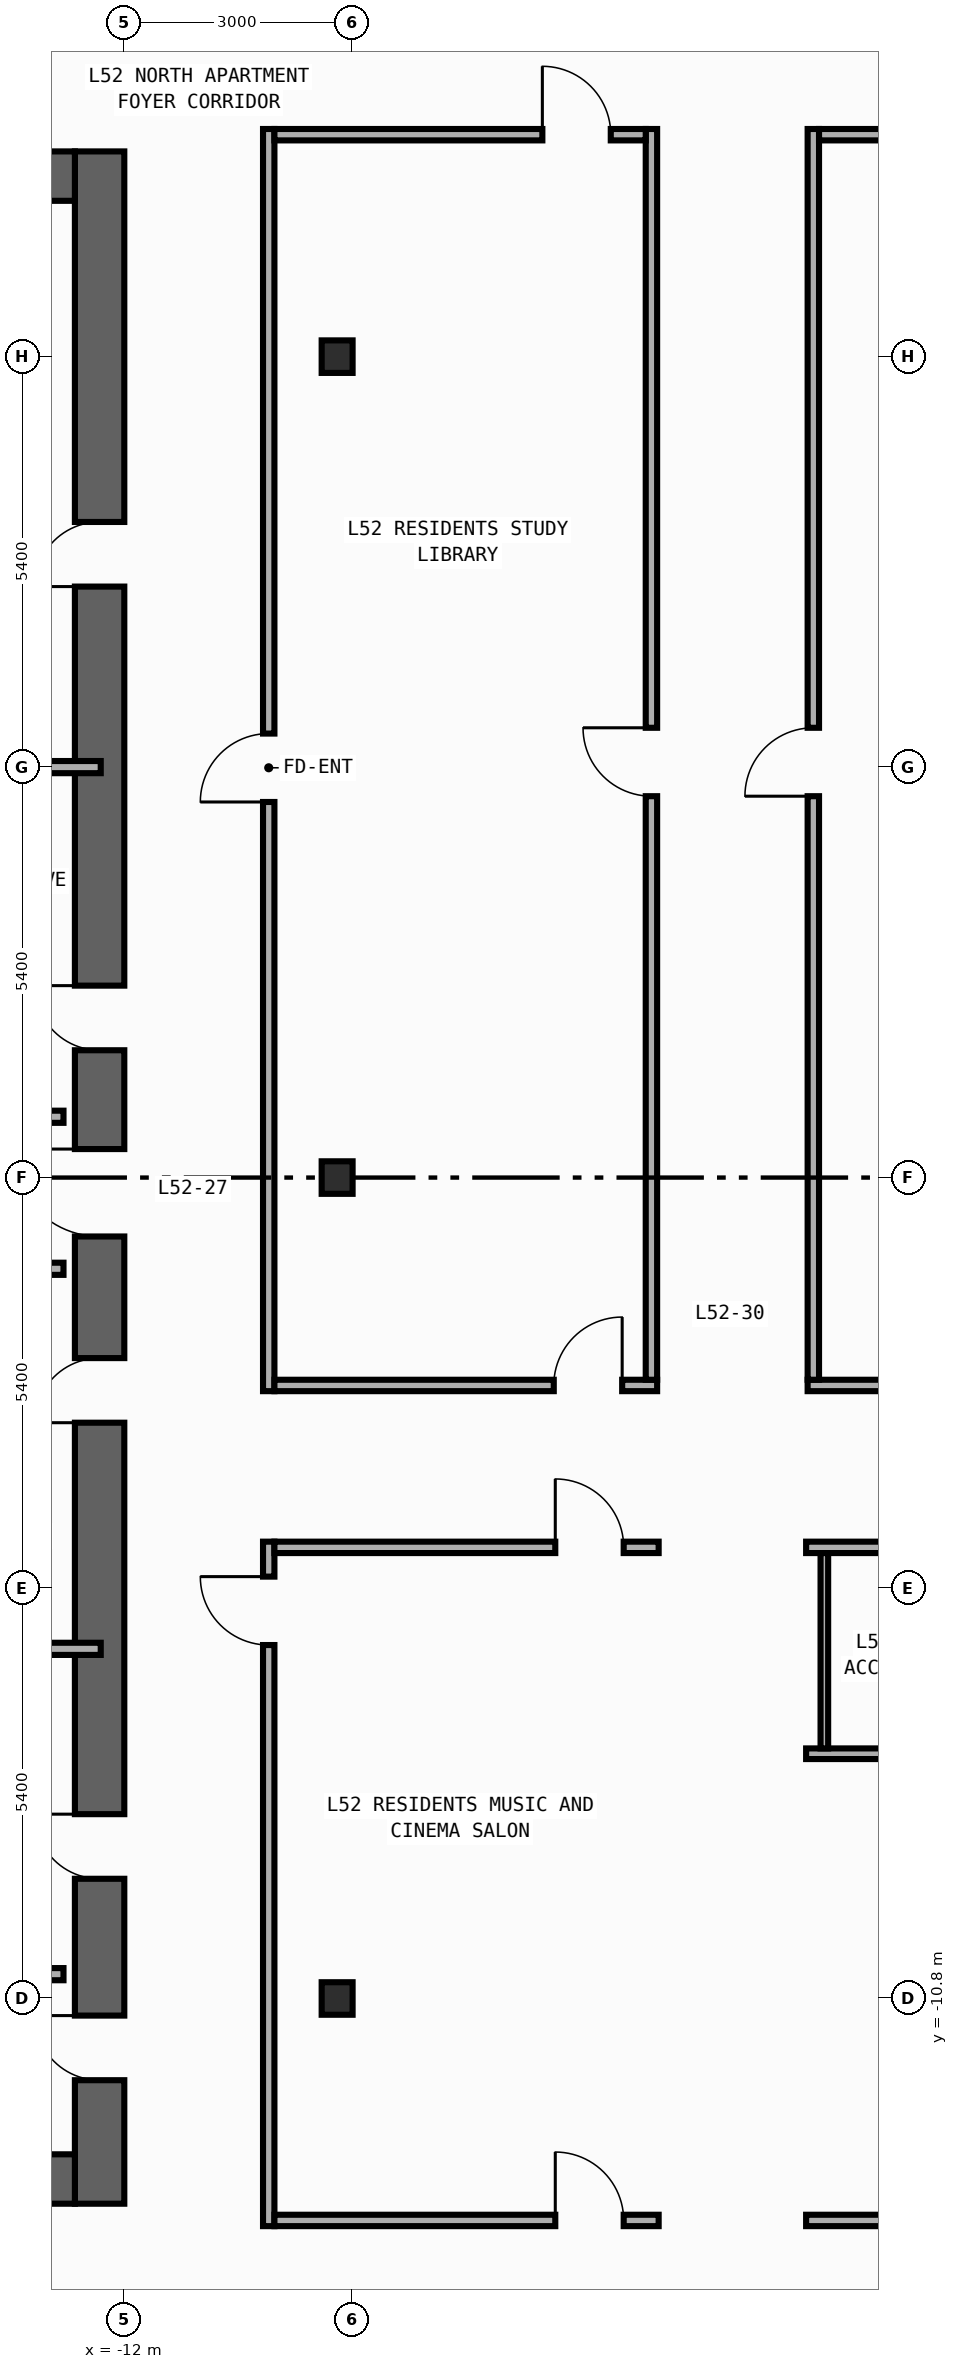
"""IFC4 building model, lengths in metres.
Left out: names, types, materials, properties, quantities, classifications, styles, units other than length and angle.
Written with IfcOpenShell. Run it as: python <this file> out.ifc"""

import sys

from ifc_helpers import new_model, si_unit, direction, frame, frame_2d, origin, origin_2d, place, context, subcontext, project, spatial, rectangle, i_section, extrude, element, fill, save


model = new_model("IFC4")
c1 = context("Model", 3, precision=1e-05, world=origin(), true_north=direction((0.0, 1.0)))
c2 = subcontext(c1, "Body", "Model", "MODEL_VIEW")
j1 = project(units=[si_unit("LENGTHUNIT", "METRE"), si_unit("PLANEANGLEUNIT", "RADIAN")], contexts=[c1])
p1 = place(None, origin())
s1 = spatial("IfcSite", under=j1, at=p1, CompositionType="ELEMENT")
p2 = place(p1, origin())
s2 = spatial("IfcBuilding", under=s1, at=p2, CompositionType="ELEMENT")
p3 = place(p2, frame((0.0, 0.0, 226.0)))
s3 = spatial("IfcBuildingStorey", under=s2, at=p3, CompositionType="ELEMENT", Elevation=226.0)
p4 = place(p3, frame((-12.325, -13.5, 0.0), z_axis=(0.0, 0.0, 1.0), x_axis=(0.0, 1.0, 0.0)))
e1 = element("IfcWall", 1, at=p4, inside=s3, PredefinedType="SHEAR", context=c2, shape_type="SweptSolid", body=[
    extrude(rectangle(XDim=27.0, YDim=0.65, at=frame_2d((13.5, 0.0))), origin(), (0.0, 0.0, 1.0), 3.34),
])
p5 = place(p4, frame((15.175, 0.0, 0.0)))
e2 = element("IfcOpeningElement", 2, at=p5, cuts=e1, PredefinedType="OPENING", context=c2, shape_type="SweptSolid", body=[
    extrude(rectangle(XDim=0.85, YDim=2.1, at=frame_2d((0.425, 1.05))), frame((0.0, 0.335, 0.0), z_axis=(0.0, -1.0, 0.0), x_axis=(1.0, 0.0, 0.0)), (0.0, 0.0, 1.0), 0.67),
])
p6 = place(p4, frame((21.275, 0.0, 0.0)))
e3 = element("IfcOpeningElement", 3, at=p6, cuts=e1, PredefinedType="OPENING", context=c2, shape_type="SweptSolid", body=[
    extrude(rectangle(XDim=0.85, YDim=2.1, at=frame_2d((0.425, 1.05))), frame((0.0, 0.335, 0.0), z_axis=(0.0, -1.0, 0.0), x_axis=(1.0, 0.0, 0.0)), (0.0, 0.0, 1.0), 0.67),
])
p7 = place(p4, frame((4.275, 0.0, 0.0)))
e4 = element("IfcOpeningElement", 4, at=p7, cuts=e1, PredefinedType="OPENING", context=c2, shape_type="SweptSolid", body=[
    extrude(rectangle(XDim=0.85, YDim=2.1, at=frame_2d((0.425, 1.05))), frame((0.0, 0.335, 0.0), z_axis=(0.0, -1.0, 0.0), x_axis=(1.0, 0.0, 0.0)), (0.0, 0.0, 1.0), 0.67),
])
p8 = place(p4, frame((10.275, 0.0, 0.0)))
e5 = element("IfcOpeningElement", 5, at=p8, cuts=e1, PredefinedType="OPENING", context=c2, shape_type="SweptSolid", body=[
    extrude(rectangle(XDim=0.85, YDim=2.1, at=frame_2d((0.425, 1.05))), frame((0.0, 0.335, 0.0), z_axis=(0.0, -1.0, 0.0), x_axis=(1.0, 0.0, 0.0)), (0.0, 0.0, 1.0), 0.67),
])
p9 = place(p4, frame((12.725, 0.0, 0.0)))
e6 = element("IfcOpeningElement", 6, at=p9, cuts=e1, PredefinedType="OPENING", context=c2, shape_type="SweptSolid", body=[
    extrude(rectangle(XDim=1.15, YDim=2.2, at=frame_2d((0.575, 1.1))), frame((0.0, 0.335, 0.0), z_axis=(0.0, -1.0, 0.0), x_axis=(1.0, 0.0, 0.0)), (0.0, 0.0, 1.0), 0.67),
])
p10 = place(p4, frame((1.625, 0.0, 0.0)))
e7 = element("IfcOpeningElement", 7, at=p10, cuts=e1, PredefinedType="OPENING", context=c2, shape_type="SweptSolid", body=[
    extrude(rectangle(XDim=0.85, YDim=2.1, at=frame_2d((0.425, 1.05))), frame((0.0, 0.335, 0.0), z_axis=(0.0, -1.0, 0.0), x_axis=(1.0, 0.0, 0.0)), (0.0, 0.0, 1.0), 0.67),
])
for number, where, z_axis, x_axis in (
    (8, (-19.75, -13.175, 0.0), (0.0, 0.0, 1.0), (1.0, 0.0, 0.0)),
    (9, (-19.75, 13.175, 0.0), (0.0, 0.0, 1.0), (1.0, 0.0, 0.0)),
):
    element("IfcWall", number, at=place(p3, frame(where, z_axis=z_axis, x_axis=x_axis)), inside=s3, PredefinedType="SHEAR", context=c2, shape_type="SweptSolid", body=[
        extrude(rectangle(XDim=7.1, YDim=0.65, at=frame_2d((3.55, 0.0))), origin(), (0.0, 0.0, 1.0), 3.34),
    ])
for number, where, z_axis, x_axis in (
    (10, (-9.2, -10.8, 0.0), (0.0, 0.0, 1.0), (1.0, 0.0, 0.0)),
    (11, (-9.2, 0.0, 0.0), (0.0, 0.0, 1.0), (1.0, 0.0, 0.0)),
    (12, (-9.2, 10.8, 0.0), (0.0, 0.0, 1.0), (1.0, 0.0, 0.0)),
):
    element("IfcColumn", number, at=place(p3, frame(where, z_axis=z_axis, x_axis=x_axis)), inside=s3, PredefinedType="COLUMN", context=c2, shape_type="SweptSolid", body=[
        extrude(i_section(OverallWidth=0.407, OverallDepth=0.428, WebThickness=0.02, FlangeThickness=0.035, FilletRadius=0.022, at=origin_2d()), origin(), (0.0, 0.0, 1.0), 3.6),
    ])
for number, where, z_axis, x_axis in (
    (13, (-15.4, 0.8, 0.0), (0.0, 0.0, 1.0), (1.0, 0.0, 0.0)),
    (14, (-15.4, -1.2, 0.0), (0.0, 0.0, 1.0), (1.0, 0.0, 0.0)),
    (15, (-15.4, -10.48, 0.0), (0.0, 0.0, 1.0), (1.0, 0.0, 0.0)),
):
    element("IfcWall", number, at=place(p3, frame(where, z_axis=z_axis, x_axis=x_axis)), inside=s3, PredefinedType="STANDARD", context=c2, shape_type="SweptSolid", body=[
        extrude(rectangle(XDim=2.6, YDim=0.16, at=frame_2d((1.3, 0.0))), origin(), (0.0, 0.0, 1.0), 3.34),
    ])
for number, where, z_axis, x_axis in (
    (16, (-15.375, 5.4, 0.0), (0.0, 0.0, 1.0), (1.0, 0.0, 0.0)),
    (17, (-15.375, -6.2, 0.0), (0.0, 0.0, 1.0), (1.0, 0.0, 0.0)),
):
    element("IfcWall", number, at=place(p3, frame(where, z_axis=z_axis, x_axis=x_axis)), inside=s3, PredefinedType="PARTITIONING", context=c2, shape_type="SweptSolid", body=[
        extrude(rectangle(XDim=3.065, YDim=0.16, at=frame_2d((1.532, 0.0))), origin(), (0.0, 0.0, 1.0), 3.34),
    ])
p11 = place(p3, frame((-10.1, -2.81, 0.0), z_axis=(0.0, 0.0, 1.0), x_axis=(0.0, 1.0, 0.0)))
e18 = element("IfcWall", 18, at=p11, inside=s3, PredefinedType="PARTITIONING", context=c2, shape_type="SweptSolid", body=[
    extrude(rectangle(XDim=16.605, YDim=0.15, at=frame_2d((8.302, 0.0))), origin(), (0.0, 0.0, 1.0), 3.34),
])
p12 = place(p11, frame((7.751, 0.0, 0.0)))
e19 = element("IfcOpeningElement", 19, at=p12, cuts=e18, PredefinedType="OPENING", context=c2, shape_type="SweptSolid", body=[
    extrude(rectangle(XDim=0.9, YDim=2.15, at=frame_2d((0.45, 1.075))), frame((0.0, 0.085, 0.0), z_axis=(0.0, -1.0, 0.0), x_axis=(1.0, 0.0, 0.0)), (0.0, 0.0, 1.0), 0.17),
])
p13 = place(p3, frame((-10.1, -13.795, 0.0), z_axis=(0.0, 0.0, 1.0), x_axis=(0.0, 1.0, 0.0)))
e20 = element("IfcWall", 20, at=p13, inside=s3, PredefinedType="PARTITIONING", context=c2, shape_type="SweptSolid", body=[
    extrude(rectangle(XDim=9.005, YDim=0.15, at=frame_2d((4.502, 0.0))), origin(), (0.0, 0.0, 1.0), 3.34),
])
p14 = place(p13, frame((7.645, 0.0, 0.0)))
e21 = element("IfcOpeningElement", 21, at=p14, cuts=e20, PredefinedType="OPENING", context=c2, shape_type="SweptSolid", body=[
    extrude(rectangle(XDim=0.9, YDim=2.15, at=frame_2d((0.45, 1.075))), frame((0.0, 0.085, 0.0), z_axis=(0.0, -1.0, 0.0), x_axis=(1.0, 0.0, 0.0)), (0.0, 0.0, 1.0), 0.17),
])
p15 = place(p3, frame((-10.025, -2.735, 0.0), z_axis=(0.0, 0.0, 1.0), x_axis=(1.0, 0.0, 0.0)))
e22 = element("IfcWall", 22, at=p15, inside=s3, PredefinedType="PARTITIONING", context=c2, shape_type="SweptSolid", body=[
    extrude(rectangle(XDim=5.035, YDim=0.15, at=frame_2d((2.518, 0.0))), origin(), (0.0, 0.0, 1.0), 3.34),
])
p16 = place(p15, frame((3.675, 0.0, 0.0)))
e23 = element("IfcOpeningElement", 23, at=p16, cuts=e22, PredefinedType="OPENING", context=c2, shape_type="SweptSolid", body=[
    extrude(rectangle(XDim=0.9, YDim=2.15, at=frame_2d((0.45, 1.075))), frame((0.0, 0.085, 0.0), z_axis=(0.0, -1.0, 0.0), x_axis=(1.0, 0.0, 0.0)), (0.0, 0.0, 1.0), 0.17),
])
p17 = place(p3, frame((-10.025, -4.865, 0.0), z_axis=(0.0, 0.0, 1.0), x_axis=(1.0, 0.0, 0.0)))
e24 = element("IfcWall", 24, at=p17, inside=s3, PredefinedType="PARTITIONING", context=c2, shape_type="SweptSolid", body=[
    extrude(rectangle(XDim=5.055, YDim=0.15, at=frame_2d((2.527, 0.0))), origin(), (0.0, 0.0, 1.0), 3.34),
])
p18 = place(p17, frame((3.695, 0.0, 0.0)))
e25 = element("IfcOpeningElement", 25, at=p18, cuts=e24, PredefinedType="OPENING", context=c2, shape_type="SweptSolid", body=[
    extrude(rectangle(XDim=0.9, YDim=2.15, at=frame_2d((0.45, 1.075))), frame((0.0, 0.085, 0.0), z_axis=(0.0, -1.0, 0.0), x_axis=(1.0, 0.0, 0.0)), (0.0, 0.0, 1.0), 0.17),
])
p19 = place(p3, frame((-3.01, -2.735, 0.0), z_axis=(0.0, 0.0, 1.0), x_axis=(1.0, 0.0, 0.0)))
e26 = element("IfcWall", 26, at=p19, inside=s3, PredefinedType="PARTITIONING", context=c2, shape_type="SweptSolid", body=[
    extrude(rectangle(XDim=13.035, YDim=0.15, at=frame_2d((6.518, 0.0))), origin(), (0.0, 0.0, 1.0), 3.34),
])
p20 = place(p19, frame((2.463, 0.0, 0.0)))
e27 = element("IfcOpeningElement", 27, at=p20, cuts=e26, PredefinedType="OPENING", context=c2, shape_type="SweptSolid", body=[
    extrude(rectangle(XDim=0.9, YDim=2.15, at=frame_2d((0.45, 1.075))), frame((0.0, 0.085, 0.0), z_axis=(0.0, -1.0, 0.0), x_axis=(1.0, 0.0, 0.0)), (0.0, 0.0, 1.0), 0.17),
])
p21 = place(p3, frame((-3.03, -4.865, 0.0), z_axis=(0.0, 0.0, 1.0), x_axis=(1.0, 0.0, 0.0)))
e28 = element("IfcWall", 28, at=p21, inside=s3, PredefinedType="PARTITIONING", context=c2, shape_type="SweptSolid", body=[
    extrude(rectangle(XDim=3.07, YDim=0.15, at=frame_2d((1.535, 0.0))), origin(), (0.0, 0.0, 1.0), 3.34),
])
p22 = place(p21, frame((1.71, 0.0, 0.0)))
e29 = element("IfcOpeningElement", 29, at=p22, cuts=e28, PredefinedType="OPENING", context=c2, shape_type="SweptSolid", body=[
    extrude(rectangle(XDim=0.9, YDim=2.15, at=frame_2d((0.45, 1.075))), frame((0.0, 0.085, 0.0), z_axis=(0.0, -1.0, 0.0), x_axis=(1.0, 0.0, 0.0)), (0.0, 0.0, 1.0), 0.17),
])
p23 = place(p3, frame((-5.065, -2.66, 0.0), z_axis=(0.0, 0.0, 1.0), x_axis=(0.0, 1.0, 0.0)))
e30 = element("IfcWall", 30, at=p23, inside=s3, PredefinedType="PARTITIONING", context=c2, shape_type="SweptSolid", body=[
    extrude(rectangle(XDim=16.455, YDim=0.15, at=frame_2d((8.228, 0.0))), origin(), (0.0, 0.0, 1.0), 2.99),
])
p24 = place(p23, frame((7.677, 0.0, 0.0)))
e31 = element("IfcOpeningElement", 31, at=p24, cuts=e30, PredefinedType="OPENING", context=c2, shape_type="SweptSolid", body=[
    extrude(rectangle(XDim=0.9, YDim=2.15, at=frame_2d((0.45, 1.075))), frame((0.0, 0.085, 0.0), z_axis=(0.0, -1.0, 0.0), x_axis=(1.0, 0.0, 0.0)), (0.0, 0.0, 1.0), 0.17),
])
p25 = place(p3, frame((-2.935, -2.66, 0.0), z_axis=(0.0, 0.0, 1.0), x_axis=(0.0, 1.0, 0.0)))
e32 = element("IfcWall", 32, at=p25, inside=s3, PredefinedType="PARTITIONING", context=c2, shape_type="SweptSolid", body=[
    extrude(rectangle(XDim=16.455, YDim=0.15, at=frame_2d((8.228, 0.0))), origin(), (0.0, 0.0, 1.0), 3.34),
])
p26 = place(p25, frame((7.677, 0.0, 0.0)))
e33 = element("IfcOpeningElement", 33, at=p26, cuts=e32, PredefinedType="OPENING", context=c2, shape_type="SweptSolid", body=[
    extrude(rectangle(XDim=0.9, YDim=2.15, at=frame_2d((0.45, 1.075))), frame((0.0, 0.085, 0.0), z_axis=(0.0, -1.0, 0.0), x_axis=(1.0, 0.0, 0.0)), (0.0, 0.0, 1.0), 0.17),
])
p27 = place(p3, frame((-10.025, 13.72, 0.0), z_axis=(0.0, 0.0, 1.0), x_axis=(1.0, 0.0, 0.0)))
e34 = element("IfcWall", 34, at=p27, inside=s3, PredefinedType="PARTITIONING", context=c2, shape_type="SweptSolid", body=[
    extrude(rectangle(XDim=4.885, YDim=0.15, at=frame_2d((2.442, 0.0))), origin(), (0.0, 0.0, 1.0), 3.34),
])
p28 = place(p27, frame((3.525, 0.0, 0.0)))
e35 = element("IfcOpeningElement", 35, at=p28, cuts=e34, PredefinedType="OPENING", context=c2, shape_type="SweptSolid", body=[
    extrude(rectangle(XDim=0.9, YDim=2.15, at=frame_2d((0.45, 1.075))), frame((0.0, 0.085, 0.0), z_axis=(0.0, -1.0, 0.0), x_axis=(1.0, 0.0, 0.0)), (0.0, 0.0, 1.0), 0.17),
])
p29 = place(p3, frame((-2.86, 13.72, 0.0), z_axis=(0.0, 0.0, 1.0), x_axis=(1.0, 0.0, 0.0)))
e36 = element("IfcWall", 36, at=p29, inside=s3, PredefinedType="PARTITIONING", context=c2, shape_type="SweptSolid", body=[
    extrude(rectangle(XDim=12.885, YDim=0.15, at=frame_2d((6.442, 0.0))), origin(), (0.0, 0.0, 1.0), 3.34),
])
p30 = place(p29, frame((4.685, 0.0, 0.0)))
e37 = element("IfcOpeningElement", 37, at=p30, cuts=e36, PredefinedType="OPENING", context=c2, shape_type="SweptSolid", body=[
    extrude(rectangle(XDim=0.9, YDim=2.15, at=frame_2d((0.45, 1.075))), frame((0.0, 0.085, 0.0), z_axis=(0.0, -1.0, 0.0), x_axis=(1.0, 0.0, 0.0)), (0.0, 0.0, 1.0), 0.17),
])
p31 = place(p3, frame((-10.025, -13.72, 0.0), z_axis=(0.0, 0.0, 1.0), x_axis=(1.0, 0.0, 0.0)))
e38 = element("IfcWall", 38, at=p31, inside=s3, PredefinedType="PARTITIONING", context=c2, shape_type="SweptSolid", body=[
    extrude(rectangle(XDim=5.055, YDim=0.15, at=frame_2d((2.527, 0.0))), origin(), (0.0, 0.0, 1.0), 3.34),
])
p32 = place(p31, frame((3.695, 0.0, 0.0)))
e39 = element("IfcOpeningElement", 39, at=p32, cuts=e38, PredefinedType="OPENING", context=c2, shape_type="SweptSolid", body=[
    extrude(rectangle(XDim=0.9, YDim=2.15, at=frame_2d((0.45, 1.075))), frame((0.0, 0.085, 0.0), z_axis=(0.0, -1.0, 0.0), x_axis=(1.0, 0.0, 0.0)), (0.0, 0.0, 1.0), 0.17),
])
p33 = place(p3, frame((-3.03, -13.72, 0.0), z_axis=(0.0, 0.0, 1.0), x_axis=(1.0, 0.0, 0.0)))
e40 = element("IfcWall", 40, at=p33, inside=s3, PredefinedType="PARTITIONING", context=c2, shape_type="SweptSolid", body=[
    extrude(rectangle(XDim=13.055, YDim=0.15, at=frame_2d((6.527, 0.0))), origin(), (0.0, 0.0, 1.0), 3.34),
])
p34 = place(p33, frame((4.874, 0.0, 0.0)))
e41 = element("IfcOpeningElement", 41, at=p34, cuts=e40, PredefinedType="OPENING", context=c2, shape_type="SweptSolid", body=[
    extrude(rectangle(XDim=0.9, YDim=2.15, at=frame_2d((0.45, 1.075))), frame((0.0, 0.085, 0.0), z_axis=(0.0, -1.0, 0.0), x_axis=(1.0, 0.0, 0.0)), (0.0, 0.0, 1.0), 0.17),
])
p35 = place(p3, frame((-3.03, -7.58, 0.0), z_axis=(0.0, 0.0, 1.0), x_axis=(1.0, 0.0, 0.0)))
e42 = element("IfcWall", 42, at=p35, inside=s3, PredefinedType="PARTITIONING", context=c2, shape_type="SweptSolid", body=[
    extrude(rectangle(XDim=3.07, YDim=0.14, at=frame_2d((1.535, 0.0))), origin(), (0.0, 0.0, 1.0), 3.34),
])
p36 = place(p3, frame((-2.79, -7.51, 0.0), z_axis=(0.0, 0.0, 1.0), x_axis=(0.0, 1.0, 0.0)))
e43 = element("IfcWall", 43, at=p36, inside=s3, PredefinedType="PARTITIONING", context=c2, shape_type="SweptSolid", body=[
    extrude(rectangle(XDim=2.57, YDim=0.1, at=frame_2d((1.285, 0.0))), origin(), (0.0, 0.0, 1.0), 3.34),
])
p37 = place(p5, origin())
e44 = element("IfcDoor", 44, at=p37, inside=s3, OperationType="SINGLE_SWING_RIGHT", PredefinedType="DOOR", context=c2, shape_type="SweptSolid", body=[
    extrude(rectangle(XDim=0.85, YDim=2.1, at=frame_2d((0.425, 1.05))), frame((0.0, 0.025, 0.0), z_axis=(0.0, -1.0, 0.0), x_axis=(1.0, 0.0, 0.0)), (0.0, 0.0, 1.0), 0.05),
])
fill(e2, e44)
p38 = place(p6, origin())
e45 = element("IfcDoor", 45, at=p38, inside=s3, OperationType="SINGLE_SWING_LEFT", PredefinedType="DOOR", context=c2, shape_type="SweptSolid", body=[
    extrude(rectangle(XDim=0.85, YDim=2.1, at=frame_2d((0.425, 1.05))), frame((0.0, 0.025, 0.0), z_axis=(0.0, -1.0, 0.0), x_axis=(1.0, 0.0, 0.0)), (0.0, 0.0, 1.0), 0.05),
])
fill(e3, e45)
p39 = place(p7, origin())
e46 = element("IfcDoor", 46, at=p39, inside=s3, OperationType="SINGLE_SWING_RIGHT", PredefinedType="DOOR", context=c2, shape_type="SweptSolid", body=[
    extrude(rectangle(XDim=0.85, YDim=2.1, at=frame_2d((0.425, 1.05))), frame((0.0, 0.025, 0.0), z_axis=(0.0, -1.0, 0.0), x_axis=(1.0, 0.0, 0.0)), (0.0, 0.0, 1.0), 0.05),
])
fill(e4, e46)
p40 = place(p8, origin())
e47 = element("IfcDoor", 47, at=p40, inside=s3, OperationType="SINGLE_SWING_LEFT", PredefinedType="DOOR", context=c2, shape_type="SweptSolid", body=[
    extrude(rectangle(XDim=0.85, YDim=2.1, at=frame_2d((0.425, 1.05))), frame((0.0, 0.025, 0.0), z_axis=(0.0, -1.0, 0.0), x_axis=(1.0, 0.0, 0.0)), (0.0, 0.0, 1.0), 0.05),
])
fill(e5, e47)
p41 = place(p9, origin())
e48 = element("IfcDoor", 48, at=p41, inside=s3, OperationType="SINGLE_SWING_RIGHT", PredefinedType="DOOR", context=c2, shape_type="SweptSolid", body=[
    extrude(rectangle(XDim=1.15, YDim=2.2, at=frame_2d((0.575, 1.1))), frame((0.0, 0.025, 0.0), z_axis=(0.0, -1.0, 0.0), x_axis=(1.0, 0.0, 0.0)), (0.0, 0.0, 1.0), 0.05),
])
fill(e6, e48)
p42 = place(p10, origin())
e49 = element("IfcDoor", 49, at=p42, inside=s3, OperationType="SINGLE_SWING_RIGHT", PredefinedType="DOOR", context=c2, shape_type="SweptSolid", body=[
    extrude(rectangle(XDim=0.85, YDim=2.1, at=frame_2d((0.425, 1.05))), frame((0.0, 0.025, 0.0), z_axis=(0.0, -1.0, 0.0), x_axis=(1.0, 0.0, 0.0)), (0.0, 0.0, 1.0), 0.05),
])
fill(e7, e49)
p43 = place(p12, origin())
e50 = element("IfcDoor", 50, at=p43, inside=s3, OperationType="SINGLE_SWING_LEFT", PredefinedType="DOOR", context=c2, shape_type="SweptSolid", body=[
    extrude(rectangle(XDim=0.9, YDim=2.15, at=frame_2d((0.45, 1.075))), frame((0.0, 0.025, 0.0), z_axis=(0.0, -1.0, 0.0), x_axis=(1.0, 0.0, 0.0)), (0.0, 0.0, 1.0), 0.05),
])
fill(e19, e50)
p44 = place(p14, origin())
e51 = element("IfcDoor", 51, at=p44, inside=s3, OperationType="SINGLE_SWING_RIGHT", PredefinedType="DOOR", context=c2, shape_type="SweptSolid", body=[
    extrude(rectangle(XDim=0.9, YDim=2.15, at=frame_2d((0.45, 1.075))), frame((0.0, 0.025, 0.0), z_axis=(0.0, -1.0, 0.0), x_axis=(1.0, 0.0, 0.0)), (0.0, 0.0, 1.0), 0.05),
])
fill(e21, e51)
p45 = place(p16, origin())
e52 = element("IfcDoor", 52, at=p45, inside=s3, OperationType="SINGLE_SWING_RIGHT", PredefinedType="DOOR", context=c2, shape_type="SweptSolid", body=[
    extrude(rectangle(XDim=0.9, YDim=2.15, at=frame_2d((0.45, 1.075))), frame((0.0, 0.025, 0.0), z_axis=(0.0, -1.0, 0.0), x_axis=(1.0, 0.0, 0.0)), (0.0, 0.0, 1.0), 0.05),
])
fill(e23, e52)
p46 = place(p18, origin())
e53 = element("IfcDoor", 53, at=p46, inside=s3, OperationType="SINGLE_SWING_LEFT", PredefinedType="DOOR", context=c2, shape_type="SweptSolid", body=[
    extrude(rectangle(XDim=0.9, YDim=2.15, at=frame_2d((0.45, 1.075))), frame((0.0, 0.025, 0.0), z_axis=(0.0, -1.0, 0.0), x_axis=(1.0, 0.0, 0.0)), (0.0, 0.0, 1.0), 0.05),
])
fill(e25, e53)
p47 = place(p24, origin())
e54 = element("IfcDoor", 54, at=p47, inside=s3, OperationType="SINGLE_SWING_RIGHT", PredefinedType="DOOR", context=c2, shape_type="SweptSolid", body=[
    extrude(rectangle(XDim=0.9, YDim=2.15, at=frame_2d((0.45, 1.075))), frame((0.0, 0.025, 0.0), z_axis=(0.0, -1.0, 0.0), x_axis=(1.0, 0.0, 0.0)), (0.0, 0.0, 1.0), 0.05),
])
fill(e31, e54)
p48 = place(p26, origin())
e55 = element("IfcDoor", 55, at=p48, inside=s3, OperationType="SINGLE_SWING_LEFT", PredefinedType="DOOR", context=c2, shape_type="SweptSolid", body=[
    extrude(rectangle(XDim=0.9, YDim=2.15, at=frame_2d((0.45, 1.075))), frame((0.0, 0.025, 0.0), z_axis=(0.0, -1.0, 0.0), x_axis=(1.0, 0.0, 0.0)), (0.0, 0.0, 1.0), 0.05),
])
fill(e33, e55)
p49 = place(p28, origin())
e56 = element("IfcDoor", 56, at=p49, inside=s3, OperationType="SINGLE_SWING_LEFT", PredefinedType="DOOR", context=c2, shape_type="SweptSolid", body=[
    extrude(rectangle(XDim=0.9, YDim=2.15, at=frame_2d((0.45, 1.075))), frame((0.0, 0.025, 0.0), z_axis=(0.0, -1.0, 0.0), x_axis=(1.0, 0.0, 0.0)), (0.0, 0.0, 1.0), 0.05),
])
fill(e35, e56)
p50 = place(p32, origin())
e57 = element("IfcDoor", 57, at=p50, inside=s3, OperationType="SINGLE_SWING_LEFT", PredefinedType="DOOR", context=c2, shape_type="SweptSolid", body=[
    extrude(rectangle(XDim=0.9, YDim=2.15, at=frame_2d((0.45, 1.075))), frame((0.0, 0.025, 0.0), z_axis=(0.0, -1.0, 0.0), x_axis=(1.0, 0.0, 0.0)), (0.0, 0.0, 1.0), 0.05),
])
fill(e39, e57)
save(model, sys.argv[1])
